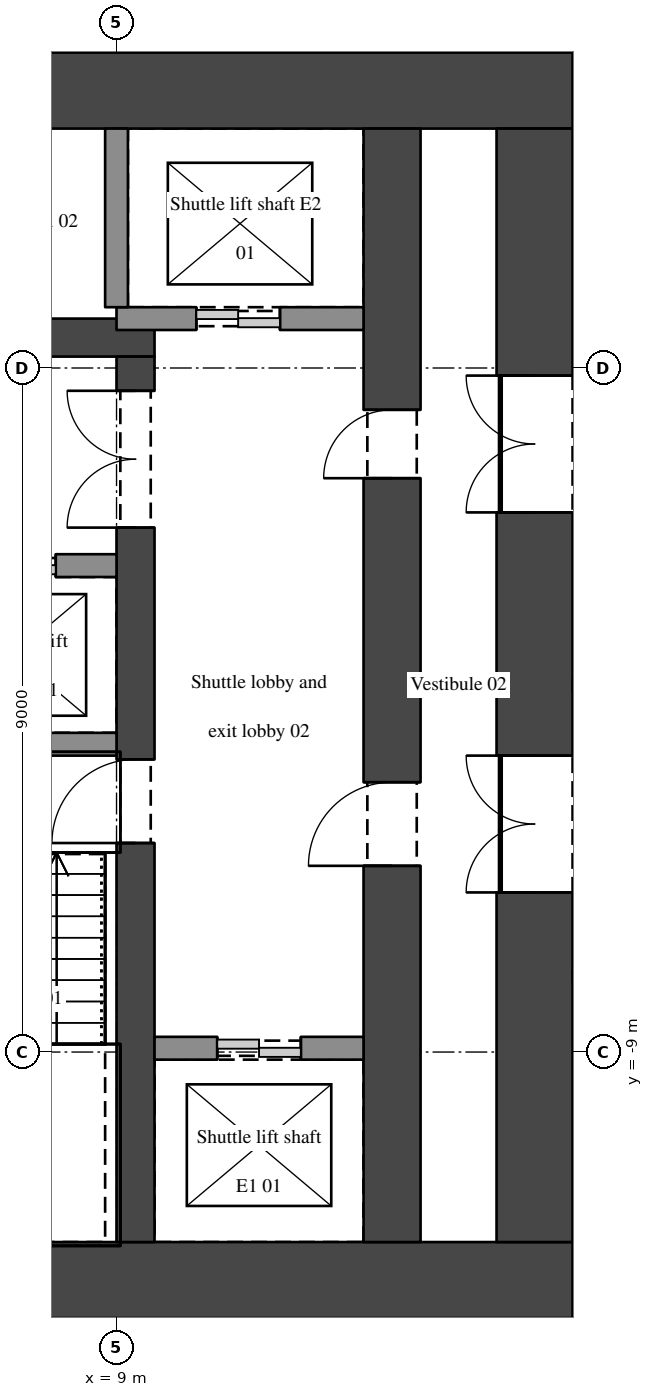
"""IFC4 building model, lengths in metres.
Left out: names, types, materials, properties, quantities, classifications, styles, units other than length and angle.
Written with IfcOpenShell. Run it as: python <this file> out.ifc"""

import sys

from ifc_helpers import new_model, si_unit, direction, frame, frame_2d, origin, place, context, subcontext, project, spatial, rectangle, extrude, element, fill, save


model = new_model("IFC4")
c1 = context("Model", 3, precision=1e-05, world=origin(), true_north=direction((0.0, 1.0)))
c2 = subcontext(c1, "Body", "Model", "MODEL_VIEW")
j1 = project(units=[si_unit("LENGTHUNIT", "METRE"), si_unit("PLANEANGLEUNIT", "RADIAN")], contexts=[c1])
p1 = place(None, origin())
s1 = spatial("IfcSite", under=j1, at=p1, CompositionType="ELEMENT")
p2 = place(p1, origin())
s2 = spatial("IfcBuilding", under=s1, at=p2, CompositionType="ELEMENT")
p3 = place(p2, origin())
s3 = spatial("IfcBuildingStorey", under=s2, at=p3, CompositionType="ELEMENT", Elevation=0.0)
for number, where, z_axis, x_axis in (
    (1, (-15.0, -12.0, 0.0), (0.0, 0.0, 1.0), (1.0, 0.0, 0.0)),
    (2, (-15.0, 3.65, 0.0), (0.0, 0.0, 1.0), (1.0, 0.0, 0.0)),
):
    element("IfcWall", number, at=place(p3, frame(where, z_axis=z_axis, x_axis=x_axis)), inside=s3, PredefinedType="SHEAR", context=c2, shape_type="SweptSolid", body=[
        extrude(rectangle(XDim=30.0, YDim=1.0, at=frame_2d((15.0, 0.0))), origin(), (0.0, 0.0, 1.0), 10.8),
    ])
p4 = place(p3, frame((14.5, -11.5, 0.0), z_axis=(0.0, 0.0, 1.0), x_axis=(0.0, 1.0, 0.0)))
e3 = element("IfcWall", 3, at=p4, inside=s3, PredefinedType="SHEAR", context=c2, shape_type="SweptSolid", body=[
    extrude(rectangle(XDim=14.65, YDim=1.0, at=frame_2d((7.325, 0.0))), origin(), (0.0, 0.0, 1.0), 10.8),
])
p5 = place(p4, frame((9.6, 0.0, 0.0)))
e4 = element("IfcOpeningElement", 4, at=p5, cuts=e3, PredefinedType="OPENING", context=c2, shape_type="SweptSolid", body=[
    extrude(rectangle(XDim=1.8, YDim=2.1, at=frame_2d((0.9, 1.05))), frame((0.0, 0.51, 0.0), z_axis=(0.0, -1.0, 0.0), x_axis=(1.0, 0.0, 0.0)), (0.0, 0.0, 1.0), 1.02),
])
p6 = place(p4, frame((4.6, 0.0, 0.0)))
e5 = element("IfcOpeningElement", 5, at=p6, cuts=e3, PredefinedType="OPENING", context=c2, shape_type="SweptSolid", body=[
    extrude(rectangle(XDim=1.8, YDim=2.1, at=frame_2d((0.9, 1.05))), frame((0.0, 0.51, 0.0), z_axis=(0.0, -1.0, 0.0), x_axis=(1.0, 0.0, 0.0)), (0.0, 0.0, 1.0), 1.02),
])
p7 = place(p3, frame((12.625, -11.5, 0.0), z_axis=(0.0, 0.0, 1.0), x_axis=(0.0, 1.0, 0.0)))
e6 = element("IfcWall", 6, at=p7, inside=s3, PredefinedType="SHEAR", context=c2, shape_type="SweptSolid", body=[
    extrude(rectangle(XDim=14.65, YDim=0.75, at=frame_2d((7.325, 0.0))), origin(), (0.0, 0.0, 1.0), 10.8),
])
p8 = place(p7, frame((4.95, 0.0, 0.0)))
e7 = element("IfcOpeningElement", 7, at=p8, cuts=e6, PredefinedType="OPENING", context=c2, shape_type="SweptSolid", body=[
    extrude(rectangle(XDim=1.1, YDim=2.1, at=frame_2d((0.55, 1.05))), frame((0.0, 0.385, 0.0), z_axis=(0.0, -1.0, 0.0), x_axis=(1.0, 0.0, 0.0)), (0.0, 0.0, 1.0), 0.77),
])
p9 = place(p7, frame((10.05, 0.0, 0.0)))
e8 = element("IfcOpeningElement", 8, at=p9, cuts=e6, PredefinedType="OPENING", context=c2, shape_type="SweptSolid", body=[
    extrude(rectangle(XDim=0.9, YDim=2.1, at=frame_2d((0.45, 1.05))), frame((0.0, 0.385, 0.0), z_axis=(0.0, -1.0, 0.0), x_axis=(1.0, 0.0, 0.0)), (0.0, 0.0, 1.0), 0.77),
])
p10 = place(p3, frame((-9.5, 0.4, 0.0), z_axis=(0.0, 0.0, 1.0), x_axis=(1.0, 0.0, 0.0)))
e9 = element("IfcWall", 9, at=p10, inside=s3, PredefinedType="SHEAR", context=c2, shape_type="SweptSolid", body=[
    extrude(rectangle(XDim=19.0, YDim=0.5, at=frame_2d((9.5, 0.0))), origin(), (0.0, 0.0, 1.0), 10.8),
])
p11 = place(p10, frame((1.4, 0.0, 0.0)))
e10 = element("IfcOpeningElement", 10, at=p11, cuts=e9, PredefinedType="OPENING", context=c2, shape_type="SweptSolid", body=[
    extrude(rectangle(XDim=0.9, YDim=2.1, at=frame_2d((0.45, 1.05))), frame((0.0, 0.26, 0.0), z_axis=(0.0, -1.0, 0.0), x_axis=(1.0, 0.0, 0.0)), (0.0, 0.0, 1.0), 0.52),
])
p12 = place(p10, frame((4.1, 0.0, 0.0)))
e11 = element("IfcOpeningElement", 11, at=p12, cuts=e9, PredefinedType="OPENING", context=c2, shape_type="SweptSolid", body=[
    extrude(rectangle(XDim=0.9, YDim=2.1, at=frame_2d((0.45, 1.05))), frame((0.0, 0.26, 0.0), z_axis=(0.0, -1.0, 0.0), x_axis=(1.0, 0.0, 0.0)), (0.0, 0.0, 1.0), 0.52),
])
p13 = place(p10, frame((6.8, 0.0, 0.0)))
e12 = element("IfcOpeningElement", 12, at=p13, cuts=e9, PredefinedType="OPENING", context=c2, shape_type="SweptSolid", body=[
    extrude(rectangle(XDim=0.9, YDim=2.1, at=frame_2d((0.45, 1.05))), frame((0.0, 0.26, 0.0), z_axis=(0.0, -1.0, 0.0), x_axis=(1.0, 0.0, 0.0)), (0.0, 0.0, 1.0), 0.52),
])
p14 = place(p10, frame((11.3, 0.0, 0.0)))
e13 = element("IfcOpeningElement", 13, at=p14, cuts=e9, PredefinedType="OPENING", context=c2, shape_type="SweptSolid", body=[
    extrude(rectangle(XDim=0.9, YDim=2.1, at=frame_2d((0.45, 1.05))), frame((0.0, 0.26, 0.0), z_axis=(0.0, -1.0, 0.0), x_axis=(1.0, 0.0, 0.0)), (0.0, 0.0, 1.0), 0.52),
])
p15 = place(p10, frame((14.0, 0.0, 0.0)))
e14 = element("IfcOpeningElement", 14, at=p15, cuts=e9, PredefinedType="OPENING", context=c2, shape_type="SweptSolid", body=[
    extrude(rectangle(XDim=0.9, YDim=2.1, at=frame_2d((0.45, 1.05))), frame((0.0, 0.26, 0.0), z_axis=(0.0, -1.0, 0.0), x_axis=(1.0, 0.0, 0.0)), (0.0, 0.0, 1.0), 0.52),
])
p16 = place(p10, frame((16.7, 0.0, 0.0)))
e15 = element("IfcOpeningElement", 15, at=p16, cuts=e9, PredefinedType="OPENING", context=c2, shape_type="SweptSolid", body=[
    extrude(rectangle(XDim=0.9, YDim=2.1, at=frame_2d((0.45, 1.05))), frame((0.0, 0.26, 0.0), z_axis=(0.0, -1.0, 0.0), x_axis=(1.0, 0.0, 0.0)), (0.0, 0.0, 1.0), 0.52),
])
p17 = place(p10, frame((9.05, 0.0, 0.0)))
e16 = element("IfcOpeningElement", 16, at=p17, cuts=e9, PredefinedType="OPENING", context=c2, shape_type="SweptSolid", body=[
    extrude(rectangle(XDim=0.9, YDim=2.1, at=frame_2d((0.45, 1.05))), frame((0.0, 0.26, 0.0), z_axis=(0.0, -1.0, 0.0), x_axis=(1.0, 0.0, 0.0)), (0.0, 0.0, 1.0), 0.52),
])
p18 = place(p3, frame((9.25, -11.5, 0.0), z_axis=(0.0, 0.0, 1.0), x_axis=(0.0, 1.0, 0.0)))
e17 = element("IfcWall", 17, at=p18, inside=s3, PredefinedType="SHEAR", context=c2, shape_type="SweptSolid", body=[
    extrude(rectangle(XDim=11.65, YDim=0.5, at=frame_2d((5.825, 0.0))), origin(), (0.0, 0.0, 1.0), 10.8),
])
p19 = place(p18, frame((9.4, 0.0, 0.0)))
e18 = element("IfcOpeningElement", 18, at=p19, cuts=e17, PredefinedType="OPENING", context=c2, shape_type="SweptSolid", body=[
    extrude(rectangle(XDim=1.8, YDim=2.1, at=frame_2d((0.9, 1.05))), frame((0.0, 0.26, 0.0), z_axis=(0.0, -1.0, 0.0), x_axis=(1.0, 0.0, 0.0)), (0.0, 0.0, 1.0), 0.52),
])
p20 = place(p18, frame((5.25, 0.0, 0.0)))
e19 = element("IfcOpeningElement", 19, at=p20, cuts=e17, PredefinedType="OPENING", context=c2, shape_type="SweptSolid", body=[
    extrude(rectangle(XDim=1.1, YDim=2.1, at=frame_2d((0.55, 1.05))), frame((0.0, 0.26, 0.0), z_axis=(0.0, -1.0, 0.0), x_axis=(1.0, 0.0, 0.0)), (0.0, 0.0, 1.0), 0.52),
])
p21 = place(p3, frame((9.5, -8.95, 0.0), z_axis=(0.0, 0.0, 1.0), x_axis=(1.0, 0.0, 0.0)))
e20 = element("IfcWall", 20, at=p21, inside=s3, PredefinedType="SHEAR", context=c2, shape_type="SweptSolid", body=[
    extrude(rectangle(XDim=2.75, YDim=0.3, at=frame_2d((1.375, 0.0))), origin(), (0.0, 0.0, 1.0), 10.8),
])
p22 = place(p21, frame((0.825, 0.0, 0.0)))
e21 = element("IfcOpeningElement", 21, at=p22, cuts=e20, PredefinedType="OPENING", context=c2, shape_type="SweptSolid", body=[
    extrude(rectangle(XDim=1.1, YDim=2.1, at=frame_2d((0.55, 1.05))), frame((0.0, 0.16, 0.0), z_axis=(0.0, -1.0, 0.0), x_axis=(1.0, 0.0, 0.0)), (0.0, 0.0, 1.0), 0.32),
])
p23 = place(p3, frame((0.9, -4.95, 0.0), z_axis=(0.0, 0.0, 1.0), x_axis=(1.0, 0.0, 0.0)))
e22 = element("IfcWall", 22, at=p23, inside=s3, PredefinedType="SHEAR", context=c2, shape_type="SweptSolid", body=[
    extrude(rectangle(XDim=8.1, YDim=0.3, at=frame_2d((4.05, 0.0))), origin(), (0.0, 0.0, 1.0), 10.8),
])
p24 = place(p3, frame((0.9, -2.6, 0.0), z_axis=(0.0, 0.0, 1.0), x_axis=(1.0, 0.0, 0.0)))
e23 = element("IfcWall", 23, at=p24, inside=s3, PredefinedType="SHEAR", context=c2, shape_type="SweptSolid", body=[
    extrude(rectangle(XDim=8.1, YDim=0.3, at=frame_2d((4.05, 0.0))), origin(), (0.0, 0.0, 1.0), 10.8),
])
p25 = place(p24, frame((0.8, 0.0, 0.0)))
e24 = element("IfcOpeningElement", 24, at=p25, cuts=e23, PredefinedType="OPENING", context=c2, shape_type="SweptSolid", body=[
    extrude(rectangle(XDim=1.1, YDim=2.1, at=frame_2d((0.55, 1.05))), frame((0.0, 0.16, 0.0), z_axis=(0.0, -1.0, 0.0), x_axis=(1.0, 0.0, 0.0)), (0.0, 0.0, 1.0), 0.32),
])
p26 = place(p24, frame((3.5, 0.0, 0.0)))
e25 = element("IfcOpeningElement", 25, at=p26, cuts=e23, PredefinedType="OPENING", context=c2, shape_type="SweptSolid", body=[
    extrude(rectangle(XDim=1.1, YDim=2.1, at=frame_2d((0.55, 1.05))), frame((0.0, 0.16, 0.0), z_axis=(0.0, -1.0, 0.0), x_axis=(1.0, 0.0, 0.0)), (0.0, 0.0, 1.0), 0.32),
])
p27 = place(p24, frame((6.2, 0.0, 0.0)))
e26 = element("IfcOpeningElement", 26, at=p27, cuts=e23, PredefinedType="OPENING", context=c2, shape_type="SweptSolid", body=[
    extrude(rectangle(XDim=1.1, YDim=2.1, at=frame_2d((0.55, 1.05))), frame((0.0, 0.16, 0.0), z_axis=(0.0, -1.0, 0.0), x_axis=(1.0, 0.0, 0.0)), (0.0, 0.0, 1.0), 0.32),
])
p28 = place(p3, frame((12.25, 0.65, 0.0), z_axis=(0.0, 0.0, 1.0), x_axis=(-1.0, 0.0, 0.0)))
e27 = element("IfcWall", 27, at=p28, inside=s3, PredefinedType="SHEAR", context=c2, shape_type="SweptSolid", body=[
    extrude(rectangle(XDim=3.25, YDim=0.3, at=frame_2d((1.625, 0.0))), origin(), (0.0, 0.0, 1.0), 10.8),
])
p29 = place(p28, frame((1.1, 0.0, 0.0)))
e28 = element("IfcOpeningElement", 28, at=p29, cuts=e27, PredefinedType="OPENING", context=c2, shape_type="SweptSolid", body=[
    extrude(rectangle(XDim=1.1, YDim=2.1, at=frame_2d((0.55, 1.05))), frame((0.0, 0.16, 0.0), z_axis=(0.0, -1.0, 0.0), x_axis=(1.0, 0.0, 0.0)), (0.0, 0.0, 1.0), 0.32),
])
p30 = place(p3, frame((9.0, 0.8, 0.0), z_axis=(0.0, 0.0, 1.0), x_axis=(0.0, 1.0, 0.0)))
e29 = element("IfcWall", 29, at=p30, inside=s3, PredefinedType="SHEAR", context=c2, shape_type="SweptSolid", body=[
    extrude(rectangle(XDim=2.35, YDim=0.3, at=frame_2d((1.175, 0.0))), origin(), (0.0, 0.0, 1.0), 10.8),
])
p31 = place(p5, origin())
e30 = element("IfcDoor", 30, at=p31, inside=s3, OperationType="DOUBLE_DOOR_SINGLE_SWING", PredefinedType="DOOR", context=c2, shape_type="SweptSolid", body=[
    extrude(rectangle(XDim=1.8, YDim=2.1, at=frame_2d((0.9, 1.05))), frame((0.0, 0.025, 0.0), z_axis=(0.0, -1.0, 0.0), x_axis=(1.0, 0.0, 0.0)), (0.0, 0.0, 1.0), 0.05),
])
fill(e4, e30)
p32 = place(p19, origin())
e31 = element("IfcDoor", 31, at=p32, inside=s3, OperationType="DOUBLE_DOOR_SINGLE_SWING", PredefinedType="DOOR", context=c2, shape_type="SweptSolid", body=[
    extrude(rectangle(XDim=1.8, YDim=2.1, at=frame_2d((0.9, 1.05))), frame((0.0, 0.025, 0.0), z_axis=(0.0, -1.0, 0.0), x_axis=(1.0, 0.0, 0.0)), (0.0, 0.0, 1.0), 0.05),
])
fill(e18, e31)
p33 = place(p20, origin())
e32 = element("IfcDoor", 32, at=p33, inside=s3, OperationType="SINGLE_SWING_LEFT", PredefinedType="DOOR", context=c2, shape_type="SweptSolid", body=[
    extrude(rectangle(XDim=1.1, YDim=2.1, at=frame_2d((0.55, 1.05))), frame((0.0, 0.025, 0.0), z_axis=(0.0, -1.0, 0.0), x_axis=(1.0, 0.0, 0.0)), (0.0, 0.0, 1.0), 0.05),
])
fill(e19, e32)
p34 = place(p8, origin())
e33 = element("IfcDoor", 33, at=p34, inside=s3, OperationType="SINGLE_SWING_LEFT", PredefinedType="DOOR", context=c2, shape_type="SweptSolid", body=[
    extrude(rectangle(XDim=1.1, YDim=2.1, at=frame_2d((0.55, 1.05))), frame((0.0, 0.025, 0.0), z_axis=(0.0, -1.0, 0.0), x_axis=(1.0, 0.0, 0.0)), (0.0, 0.0, 1.0), 0.05),
])
fill(e7, e33)
p35 = place(p6, origin())
e34 = element("IfcDoor", 34, at=p35, inside=s3, OperationType="DOUBLE_DOOR_SINGLE_SWING", PredefinedType="DOOR", context=c2, shape_type="SweptSolid", body=[
    extrude(rectangle(XDim=1.8, YDim=2.1, at=frame_2d((0.9, 1.05))), frame((0.0, 0.025, 0.0), z_axis=(0.0, -1.0, 0.0), x_axis=(1.0, 0.0, 0.0)), (0.0, 0.0, 1.0), 0.05),
])
fill(e5, e34)
p36 = place(p9, origin())
e35 = element("IfcDoor", 35, at=p36, inside=s3, OperationType="SINGLE_SWING_LEFT", PredefinedType="DOOR", context=c2, shape_type="SweptSolid", body=[
    extrude(rectangle(XDim=0.9, YDim=2.1, at=frame_2d((0.45, 1.05))), frame((0.0, 0.025, 0.0), z_axis=(0.0, -1.0, 0.0), x_axis=(1.0, 0.0, 0.0)), (0.0, 0.0, 1.0), 0.05),
])
fill(e8, e35)
p37 = place(p27, origin())
e36 = element("IfcDoor", 36, at=p37, inside=s3, OperationType="DOUBLE_DOOR_SLIDING", PredefinedType="DOOR", context=c2, shape_type="SweptSolid", body=[
    extrude(rectangle(XDim=1.1, YDim=2.1, at=frame_2d((0.55, 1.05))), frame((0.0, 0.025, 0.0), z_axis=(0.0, -1.0, 0.0), x_axis=(1.0, 0.0, 0.0)), (0.0, 0.0, 1.0), 0.05),
])
fill(e26, e36)
p38 = place(p29, origin())
e37 = element("IfcDoor", 37, at=p38, inside=s3, OperationType="DOUBLE_DOOR_SLIDING", PredefinedType="DOOR", context=c2, shape_type="SweptSolid", body=[
    extrude(rectangle(XDim=1.1, YDim=2.1, at=frame_2d((0.55, 1.05))), frame((0.0, 0.025, 0.0), z_axis=(0.0, -1.0, 0.0), x_axis=(1.0, 0.0, 0.0)), (0.0, 0.0, 1.0), 0.05),
])
fill(e28, e37)
p39 = place(p22, origin())
e38 = element("IfcDoor", 38, at=p39, inside=s3, OperationType="DOUBLE_DOOR_SLIDING", PredefinedType="DOOR", context=c2, shape_type="SweptSolid", body=[
    extrude(rectangle(XDim=1.1, YDim=2.1, at=frame_2d((0.55, 1.05))), frame((0.0, 0.025, 0.0), z_axis=(0.0, -1.0, 0.0), x_axis=(1.0, 0.0, 0.0)), (0.0, 0.0, 1.0), 0.05),
])
fill(e21, e38)
save(model, sys.argv[1])
